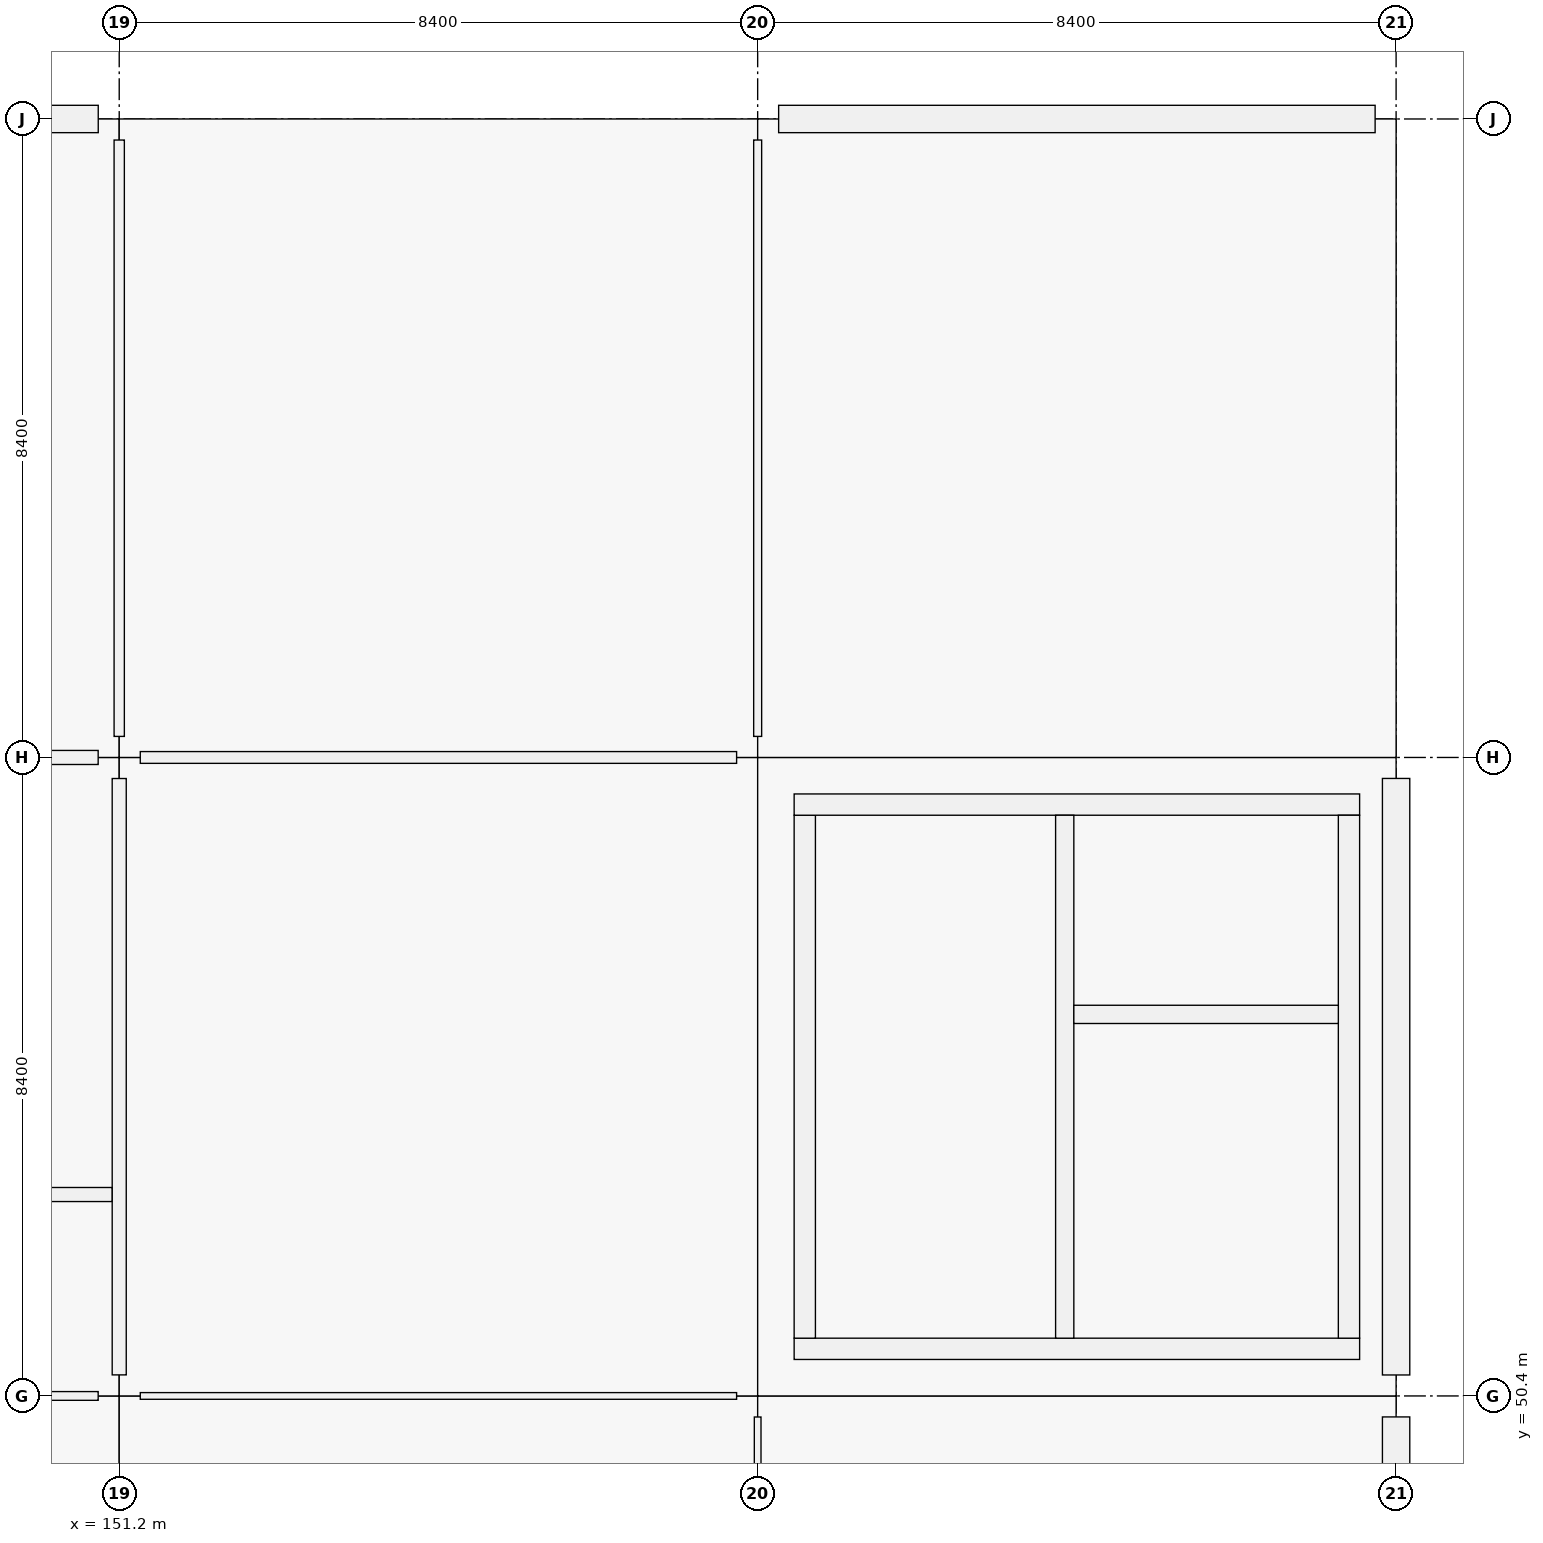
"""IFC4 building model, lengths in metres.
Left out: names, types, materials, properties, quantities, classifications, styles, units other than length and angle.
Written with IfcOpenShell. Run it as: python <this file> out.ifc"""

import sys

from ifc_helpers import new_model, si_unit, direction, frame, frame_2d, origin, origin_2d, place, context, subcontext, project, spatial, rectangle, i_section, extrude, element, fill, save


model = new_model("IFC4")
c1 = context("Model", 3, precision=1e-05, world=origin(), true_north=direction((0.0, 1.0)))
c2 = subcontext(c1, "Body", "Model", "MODEL_VIEW")
j1 = project(units=[si_unit("LENGTHUNIT", "METRE"), si_unit("PLANEANGLEUNIT", "RADIAN")], contexts=[c1])
p1 = place(None, origin())
s1 = spatial("IfcSite", under=j1, at=p1, CompositionType="ELEMENT")
p2 = place(p1, origin())
s2 = spatial("IfcBuilding", under=s1, at=p2, CompositionType="ELEMENT")
p3 = place(p2, frame((0.0, 0.0, 14.76)))
s3 = spatial("IfcBuildingStorey", under=s2, at=p3, CompositionType="ELEMENT", Elevation=14.76)
for number, where, z_axis, x_axis in (
    (1, (151.2, 50.4, 0.0), (0.0, 0.0, 1.0), (1.0, 0.0, 0.0)),
    (2, (151.2, 58.8, 0.0), (0.0, 0.0, 1.0), (1.0, 0.0, 0.0)),
    (3, (151.2, 67.2, 0.0), (0.0, 0.0, 1.0), (1.0, 0.0, 0.0)),
    (4, (159.6, 50.4, 0.0), (0.0, 0.0, 1.0), (1.0, 0.0, 0.0)),
    (5, (159.6, 58.8, 0.0), (0.0, 0.0, 1.0), (1.0, 0.0, 0.0)),
    (6, (159.6, 67.2, 0.0), (0.0, 0.0, 1.0), (1.0, 0.0, 0.0)),
    (7, (168.0, 50.4, 0.0), (0.0, 0.0, 1.0), (1.0, 0.0, 0.0)),
    (8, (168.0, 58.8, 0.0), (0.0, 0.0, 1.0), (1.0, 0.0, 0.0)),
    (9, (168.0, 67.2, 0.0), (0.0, 0.0, 1.0), (1.0, 0.0, 0.0)),
):
    element("IfcColumn", number, at=place(p3, frame(where, z_axis=z_axis, x_axis=x_axis)), inside=s3, PredefinedType="COLUMN", context=c2, shape_type="SweptSolid", body=[
        extrude(rectangle(XDim=0.55, YDim=0.55, at=origin_2d()), origin(), (0.0, 0.0, 1.0), 4.17),
    ])
for number, where, z_axis, x_axis in (
    (10, (151.2, 50.4, 4.17), (0.0, 0.0, 1.0), (1.0, 0.0, 0.0)),
    (11, (159.6, 50.4, 4.17), (0.0, 0.0, 1.0), (1.0, 0.0, 0.0)),
    (12, (167.86, 50.4, 4.17), (0.0, 0.0, 1.0), (1.0, 0.0, 0.0)),
    (13, (151.2, 58.8, 4.17), (0.0, 0.0, 1.0), (1.0, 0.0, 0.0)),
    (14, (159.6, 58.8, 4.17), (0.0, 0.0, 1.0), (1.0, 0.0, 0.0)),
    (15, (167.86, 58.8, 4.17), (0.0, 0.0, 1.0), (1.0, 0.0, 0.0)),
):
    element("IfcColumn", number, at=place(p3, frame(where, z_axis=z_axis, x_axis=x_axis)), inside=s3, PredefinedType="COLUMN", context=c2, shape_type="SweptSolid", body=[
        extrude(i_section(OverallWidth=0.254, OverallDepth=0.254, WebThickness=0.009, FlangeThickness=0.014, FilletRadius=0.013, at=origin_2d()), origin(), (0.0, 0.0, 1.0), 2.157),
    ])
p4 = place(p3, frame((143.076, 67.2, 0.0), z_axis=(0.0, 0.0, 1.0), x_axis=(1.0, 0.0, 0.0)))
e16 = element("IfcWall", 16, at=p4, inside=s3, PredefinedType="SOLIDWALL", context=c2, shape_type="SweptSolid", body=[
    extrude(rectangle(XDim=7.848, YDim=0.36, at=frame_2d((3.924, 0.0))), origin(), (0.0, 0.0, 1.0), 3.37),
])
p5 = place(p4, frame((3.024, 0.0, 0.9)))
e17 = element("IfcOpeningElement", 17, at=p5, cuts=e16, PredefinedType="OPENING", context=c2, shape_type="SweptSolid", body=[
    extrude(rectangle(XDim=1.8, YDim=1.35, at=frame_2d((0.9, 0.675))), frame((0.0, 0.18, 0.0), z_axis=(0.0, -1.0, 0.0), x_axis=(1.0, 0.0, 0.0)), (0.0, 0.0, 1.0), 0.36),
])
p6 = place(p3, frame((168.0, 50.124, 0.0), z_axis=(0.0, 0.0, 1.0), x_axis=(0.0, -1.0, 0.0)))
e18 = element("IfcWall", 18, at=p6, inside=s3, PredefinedType="SOLIDWALL", context=c2, shape_type="SweptSolid", body=[
    extrude(rectangle(XDim=7.848, YDim=0.36, at=frame_2d((3.924, 0.0))), origin(), (0.0, 0.0, 1.0), 3.37),
])
p7 = place(p6, frame((2.974, 0.0, 0.9)))
e19 = element("IfcOpeningElement", 19, at=p7, cuts=e18, PredefinedType="OPENING", context=c2, shape_type="SweptSolid", body=[
    extrude(rectangle(XDim=1.9, YDim=1.75, at=frame_2d((0.95, 0.875))), frame((0.0, 0.18, 0.0), z_axis=(0.0, -1.0, 0.0), x_axis=(1.0, 0.0, 0.0)), (0.0, 0.0, 1.0), 0.36),
])
p8 = place(p3, frame((168.0, 58.524, 0.0), z_axis=(0.0, 0.0, 1.0), x_axis=(0.0, -1.0, 0.0)))
e20 = element("IfcWall", 20, at=p8, inside=s3, PredefinedType="SOLIDWALL", context=c2, shape_type="SweptSolid", body=[
    extrude(rectangle(XDim=7.848, YDim=0.36, at=frame_2d((3.924, 0.0))), origin(), (0.0, 0.0, 1.0), 3.37),
])
p9 = place(p3, frame((159.876, 67.2, 0.0), z_axis=(0.0, 0.0, 1.0), x_axis=(1.0, 0.0, 0.0)))
e21 = element("IfcWall", 21, at=p9, inside=s3, PredefinedType="SOLIDWALL", context=c2, shape_type="SweptSolid", body=[
    extrude(rectangle(XDim=7.848, YDim=0.36, at=frame_2d((3.924, 0.0))), origin(), (0.0, 0.0, 1.0), 3.37),
])
p10 = place(p9, frame((3.224, 0.0, 0.9)))
e22 = element("IfcOpeningElement", 22, at=p10, cuts=e21, PredefinedType="OPENING", context=c2, shape_type="SweptSolid", body=[
    extrude(rectangle(XDim=1.4, YDim=1.75, at=frame_2d((0.7, 0.875))), frame((0.0, 0.18, 0.0), z_axis=(0.0, -1.0, 0.0), x_axis=(1.0, 0.0, 0.0)), (0.0, 0.0, 1.0), 0.36),
])
p11 = place(p3, frame((167.52, 51.02, 0.0), z_axis=(0.0, 0.0, 1.0), x_axis=(-1.0, 0.0, 0.0)))
e23 = element("IfcWall", 23, at=p11, inside=s3, PredefinedType="SHEAR", context=c2, shape_type="SweptSolid", body=[
    extrude(rectangle(XDim=7.44, YDim=0.28, at=frame_2d((3.72, 0.0))), origin(), (0.0, 0.0, 1.0), 4.07),
])
p12 = place(p11, frame((1.28, 0.0, 0.0)))
e24 = element("IfcOpeningElement", 24, at=p12, cuts=e23, PredefinedType="OPENING", context=c2, shape_type="SweptSolid", body=[
    extrude(rectangle(XDim=1.5, YDim=2.15, at=frame_2d((0.75, 1.075))), frame((0.0, 0.14, 0.0), z_axis=(0.0, -1.0, 0.0), x_axis=(1.0, 0.0, 0.0)), (0.0, 0.0, 1.0), 0.28),
])
p13 = place(p3, frame((160.22, 51.16, 0.0), z_axis=(0.0, 0.0, 1.0), x_axis=(0.0, 1.0, 0.0)))
e25 = element("IfcWall", 25, at=p13, inside=s3, PredefinedType="SHEAR", context=c2, shape_type="SweptSolid", body=[
    extrude(rectangle(XDim=6.88, YDim=0.28, at=frame_2d((3.44, 0.0))), origin(), (0.0, 0.0, 1.0), 4.07),
])
p14 = place(p3, frame((160.08, 58.18, 0.0), z_axis=(0.0, 0.0, 1.0), x_axis=(1.0, 0.0, 0.0)))
e26 = element("IfcWall", 26, at=p14, inside=s3, PredefinedType="SHEAR", context=c2, shape_type="SweptSolid", body=[
    extrude(rectangle(XDim=7.44, YDim=0.28, at=frame_2d((3.72, 0.0))), origin(), (0.0, 0.0, 1.0), 4.07),
])
p15 = place(p3, frame((167.38, 58.04, 0.0), z_axis=(0.0, 0.0, 1.0), x_axis=(0.0, -1.0, 0.0)))
e27 = element("IfcWall", 27, at=p15, inside=s3, PredefinedType="SHEAR", context=c2, shape_type="SweptSolid", body=[
    extrude(rectangle(XDim=6.88, YDim=0.28, at=frame_2d((3.44, 0.0))), origin(), (0.0, 0.0, 1.0), 4.07),
])
p16 = place(p3, frame((163.64, 51.16, 0.0), z_axis=(0.0, 0.0, 1.0), x_axis=(0.0, 1.0, 0.0)))
e28 = element("IfcWall", 28, at=p16, inside=s3, PredefinedType="SHEAR", context=c2, shape_type="SweptSolid", body=[
    extrude(rectangle(XDim=6.88, YDim=0.24, at=frame_2d((3.44, 0.0))), origin(), (0.0, 0.0, 1.0), 4.07),
])
p17 = place(p16, frame((0.12, 0.0, 0.0)))
e29 = element("IfcOpeningElement", 29, at=p17, cuts=e28, PredefinedType="OPENING", context=c2, shape_type="SweptSolid", body=[
    extrude(rectangle(XDim=1.0, YDim=2.15, at=frame_2d((0.5, 1.075))), frame((0.0, 0.12, 0.0), z_axis=(0.0, -1.0, 0.0), x_axis=(1.0, 0.0, 0.0)), (0.0, 0.0, 1.0), 0.24),
])
p18 = place(p3, frame((163.76, 55.42, 0.0), z_axis=(0.0, 0.0, 1.0), x_axis=(1.0, 0.0, 0.0)))
e30 = element("IfcWall", 30, at=p18, inside=s3, PredefinedType="SHEAR", context=c2, shape_type="SweptSolid", body=[
    extrude(rectangle(XDim=3.48, YDim=0.24, at=frame_2d((1.74, 0.0))), origin(), (0.0, 0.0, 1.0), 4.07),
])
p19 = place(p18, frame((1.09, 0.0, 0.0)))
e31 = element("IfcOpeningElement", 31, at=p19, cuts=e30, PredefinedType="OPENING", context=c2, shape_type="SweptSolid", body=[
    extrude(rectangle(XDim=1.3, YDim=2.25, at=frame_2d((0.65, 1.125))), frame((0.0, 0.12, 0.0), z_axis=(0.0, -1.0, 0.0), x_axis=(1.0, 0.0, 0.0)), (0.0, 0.0, 1.0), 0.24),
])
p20 = place(p3, frame((143.077, 50.4, 0.0), z_axis=(0.0, 0.0, 1.0), x_axis=(1.0, 0.0, 0.0)))
e32 = element("IfcWall", 32, at=p20, inside=s3, PredefinedType="PARTITIONING", context=c2, shape_type="SweptSolid", body=[
    extrude(rectangle(XDim=7.846, YDim=0.115, at=frame_2d((3.923, 0.0))), origin(), (0.0, 0.0, 1.0), 3.19),
])
p21 = place(p3, frame((143.077, 58.8, 0.0), z_axis=(0.0, 0.0, 1.0), x_axis=(1.0, 0.0, 0.0)))
e33 = element("IfcWall", 33, at=p21, inside=s3, PredefinedType="PARTITIONING", context=c2, shape_type="SweptSolid", body=[
    extrude(rectangle(XDim=7.846, YDim=0.185, at=frame_2d((3.923, 0.0))), origin(), (0.0, 0.0, 1.0), 3.19),
])
p22 = place(p3, frame((151.477, 50.4, 0.0), z_axis=(0.0, 0.0, 1.0), x_axis=(1.0, 0.0, 0.0)))
e34 = element("IfcWall", 34, at=p22, inside=s3, PredefinedType="PARTITIONING", context=c2, shape_type="SweptSolid", body=[
    extrude(rectangle(XDim=7.846, YDim=0.088, at=frame_2d((3.923, 0.0))), origin(), (0.0, 0.0, 1.0), 3.19),
])
p23 = place(p22, frame((3.458, 0.0, 0.0)))
e35 = element("IfcOpeningElement", 35, at=p23, cuts=e34, PredefinedType="OPENING", context=c2, shape_type="SweptSolid", body=[
    extrude(rectangle(XDim=0.93, YDim=2.12, at=frame_2d((0.465, 1.06))), frame((0.0, 0.044, 0.0), z_axis=(0.0, -1.0, 0.0), x_axis=(1.0, 0.0, 0.0)), (0.0, 0.0, 1.0), 0.088),
])
p24 = place(p3, frame((151.477, 58.8, 0.0), z_axis=(0.0, 0.0, 1.0), x_axis=(1.0, 0.0, 0.0)))
e36 = element("IfcWall", 36, at=p24, inside=s3, PredefinedType="PARTITIONING", context=c2, shape_type="SweptSolid", body=[
    extrude(rectangle(XDim=7.846, YDim=0.155, at=frame_2d((3.923, 0.0))), origin(), (0.0, 0.0, 1.0), 3.19),
])
p25 = place(p24, frame((3.383, 0.0, 0.0)))
e37 = element("IfcOpeningElement", 37, at=p25, cuts=e36, PredefinedType="OPENING", context=c2, shape_type="SweptSolid", body=[
    extrude(rectangle(XDim=1.08, YDim=2.25, at=frame_2d((0.54, 1.125))), frame((0.0, 0.078, 0.0), z_axis=(0.0, -1.0, 0.0), x_axis=(1.0, 0.0, 0.0)), (0.0, 0.0, 1.0), 0.155),
])
p26 = place(p3, frame((151.2, 50.677, 0.0), z_axis=(0.0, 0.0, 1.0), x_axis=(0.0, 1.0, 0.0)))
e38 = element("IfcWall", 38, at=p26, inside=s3, PredefinedType="PARTITIONING", context=c2, shape_type="SweptSolid", body=[
    extrude(rectangle(XDim=7.846, YDim=0.185, at=frame_2d((3.923, 0.0))), origin(), (0.0, 0.0, 1.0), 3.19),
])
p27 = place(p3, frame((151.2, 59.077, 0.0), z_axis=(0.0, 0.0, 1.0), x_axis=(0.0, 1.0, 0.0)))
e39 = element("IfcWall", 39, at=p27, inside=s3, PredefinedType="PARTITIONING", context=c2, shape_type="SweptSolid", body=[
    extrude(rectangle(XDim=7.846, YDim=0.135, at=frame_2d((3.923, 0.0))), origin(), (0.0, 0.0, 1.0), 3.19),
])
p28 = place(p27, frame((3.443, 0.0, 0.0)))
e40 = element("IfcOpeningElement", 40, at=p28, cuts=e39, PredefinedType="OPENING", context=c2, shape_type="SweptSolid", body=[
    extrude(rectangle(XDim=0.96, YDim=2.18, at=frame_2d((0.48, 1.09))), frame((0.0, 0.067, 0.0), z_axis=(0.0, -1.0, 0.0), x_axis=(1.0, 0.0, 0.0)), (0.0, 0.0, 1.0), 0.135),
])
p29 = place(p3, frame((159.6, 42.277, 0.0), z_axis=(0.0, 0.0, 1.0), x_axis=(0.0, 1.0, 0.0)))
e41 = element("IfcWall", 41, at=p29, inside=s3, PredefinedType="PARTITIONING", context=c2, shape_type="SweptSolid", body=[
    extrude(rectangle(XDim=7.846, YDim=0.088, at=frame_2d((3.923, 0.0))), origin(), (0.0, 0.0, 1.0), 3.19),
])
p30 = place(p29, frame((3.463, 0.0, 0.0)))
e42 = element("IfcOpeningElement", 42, at=p30, cuts=e41, PredefinedType="OPENING", context=c2, shape_type="SweptSolid", body=[
    extrude(rectangle(XDim=0.92, YDim=2.15, at=frame_2d((0.46, 1.075))), frame((0.0, 0.044, 0.0), z_axis=(0.0, -1.0, 0.0), x_axis=(1.0, 0.0, 0.0)), (0.0, 0.0, 1.0), 0.088),
])
p31 = place(p3, frame((159.6, 59.077, 0.0), z_axis=(0.0, 0.0, 1.0), x_axis=(0.0, 1.0, 0.0)))
e43 = element("IfcWall", 43, at=p31, inside=s3, PredefinedType="PARTITIONING", context=c2, shape_type="SweptSolid", body=[
    extrude(rectangle(XDim=7.846, YDim=0.105, at=frame_2d((3.923, 0.0))), origin(), (0.0, 0.0, 1.0), 3.19),
])
p32 = place(p31, frame((3.463, 0.0, 0.0)))
e44 = element("IfcOpeningElement", 44, at=p32, cuts=e43, PredefinedType="OPENING", context=c2, shape_type="SweptSolid", body=[
    extrude(rectangle(XDim=0.92, YDim=2.15, at=frame_2d((0.46, 1.075))), frame((0.0, 0.052, 0.0), z_axis=(0.0, -1.0, 0.0), x_axis=(1.0, 0.0, 0.0)), (0.0, 0.0, 1.0), 0.105),
])
p33 = place(p3, frame((142.85, 53.05, 0.0), z_axis=(0.0, 0.0, 1.0), x_axis=(1.0, 0.0, 0.0)))
e45 = element("IfcWall", 45, at=p33, inside=s3, PredefinedType="PARTITIONING", context=c2, shape_type="SweptSolid", body=[
    extrude(rectangle(XDim=8.256, YDim=0.185, at=frame_2d((4.128, 0.0))), origin(), (0.0, 0.0, 1.0), 3.19),
])
p34 = place(p10, origin())
e46 = element("IfcWindow", 46, at=p34, inside=s3, PartitioningType="SINGLE_PANEL", PredefinedType="WINDOW", context=c2, shape_type="SweptSolid", body=[
    extrude(rectangle(XDim=1.4, YDim=1.75, at=frame_2d((0.7, 0.875))), frame((0.0, 0.03, 0.0), z_axis=(0.0, -1.0, 0.0), x_axis=(1.0, 0.0, 0.0)), (0.0, 0.0, 1.0), 0.06),
])
fill(e22, e46)
p35 = place(p17, origin())
e47 = element("IfcDoor", 47, at=p35, inside=s3, OperationType="SINGLE_SWING_LEFT", PredefinedType="DOOR", context=c2, shape_type="SweptSolid", body=[
    extrude(rectangle(XDim=1.0, YDim=2.15, at=frame_2d((0.5, 1.075))), frame((0.0, 0.025, 0.0), z_axis=(0.0, -1.0, 0.0), x_axis=(1.0, 0.0, 0.0)), (0.0, 0.0, 1.0), 0.05),
])
fill(e29, e47)
p36 = place(p12, origin())
e48 = element("IfcDoor", 48, at=p36, inside=s3, OperationType="DOUBLE_DOOR_SINGLE_SWING", PredefinedType="DOOR", context=c2, shape_type="SweptSolid", body=[
    extrude(rectangle(XDim=1.5, YDim=2.15, at=frame_2d((0.75, 1.075))), frame((0.0, 0.025, 0.0), z_axis=(0.0, -1.0, 0.0), x_axis=(1.0, 0.0, 0.0)), (0.0, 0.0, 1.0), 0.05),
])
fill(e24, e48)
p37 = place(p19, origin())
e49 = element("IfcDoor", 49, at=p37, inside=s3, OperationType="DOUBLE_DOOR_SLIDING", PredefinedType="DOOR", context=c2, shape_type="SweptSolid", body=[
    extrude(rectangle(XDim=1.3, YDim=2.25, at=frame_2d((0.65, 1.125))), frame((0.0, 0.025, 0.0), z_axis=(0.0, -1.0, 0.0), x_axis=(1.0, 0.0, 0.0)), (0.0, 0.0, 1.0), 0.05),
])
fill(e31, e49)
p38 = place(p23, origin())
e50 = element("IfcDoor", 50, at=p38, inside=s3, OperationType="SINGLE_SWING_LEFT", PredefinedType="DOOR", context=c2, shape_type="SweptSolid", body=[
    extrude(rectangle(XDim=0.93, YDim=2.12, at=frame_2d((0.465, 1.06))), frame((0.0, 0.025, 0.0), z_axis=(0.0, -1.0, 0.0), x_axis=(1.0, 0.0, 0.0)), (0.0, 0.0, 1.0), 0.05),
])
fill(e35, e50)
p39 = place(p25, origin())
e51 = element("IfcDoor", 51, at=p39, inside=s3, OperationType="SINGLE_SWING_RIGHT", PredefinedType="DOOR", context=c2, shape_type="SweptSolid", body=[
    extrude(rectangle(XDim=1.08, YDim=2.25, at=frame_2d((0.54, 1.125))), frame((0.0, 0.025, 0.0), z_axis=(0.0, -1.0, 0.0), x_axis=(1.0, 0.0, 0.0)), (0.0, 0.0, 1.0), 0.05),
])
fill(e37, e51)
p40 = place(p28, origin())
e52 = element("IfcDoor", 52, at=p40, inside=s3, OperationType="SINGLE_SWING_RIGHT", PredefinedType="DOOR", context=c2, shape_type="SweptSolid", body=[
    extrude(rectangle(XDim=0.96, YDim=2.18, at=frame_2d((0.48, 1.09))), frame((0.0, 0.025, 0.0), z_axis=(0.0, -1.0, 0.0), x_axis=(1.0, 0.0, 0.0)), (0.0, 0.0, 1.0), 0.05),
])
fill(e40, e52)
p41 = place(p32, origin())
e53 = element("IfcDoor", 53, at=p41, inside=s3, OperationType="SINGLE_SWING_RIGHT", PredefinedType="DOOR", context=c2, shape_type="SweptSolid", body=[
    extrude(rectangle(XDim=0.92, YDim=2.15, at=frame_2d((0.46, 1.075))), frame((0.0, 0.025, 0.0), z_axis=(0.0, -1.0, 0.0), x_axis=(1.0, 0.0, 0.0)), (0.0, 0.0, 1.0), 0.05),
])
fill(e44, e53)
save(model, sys.argv[1])
